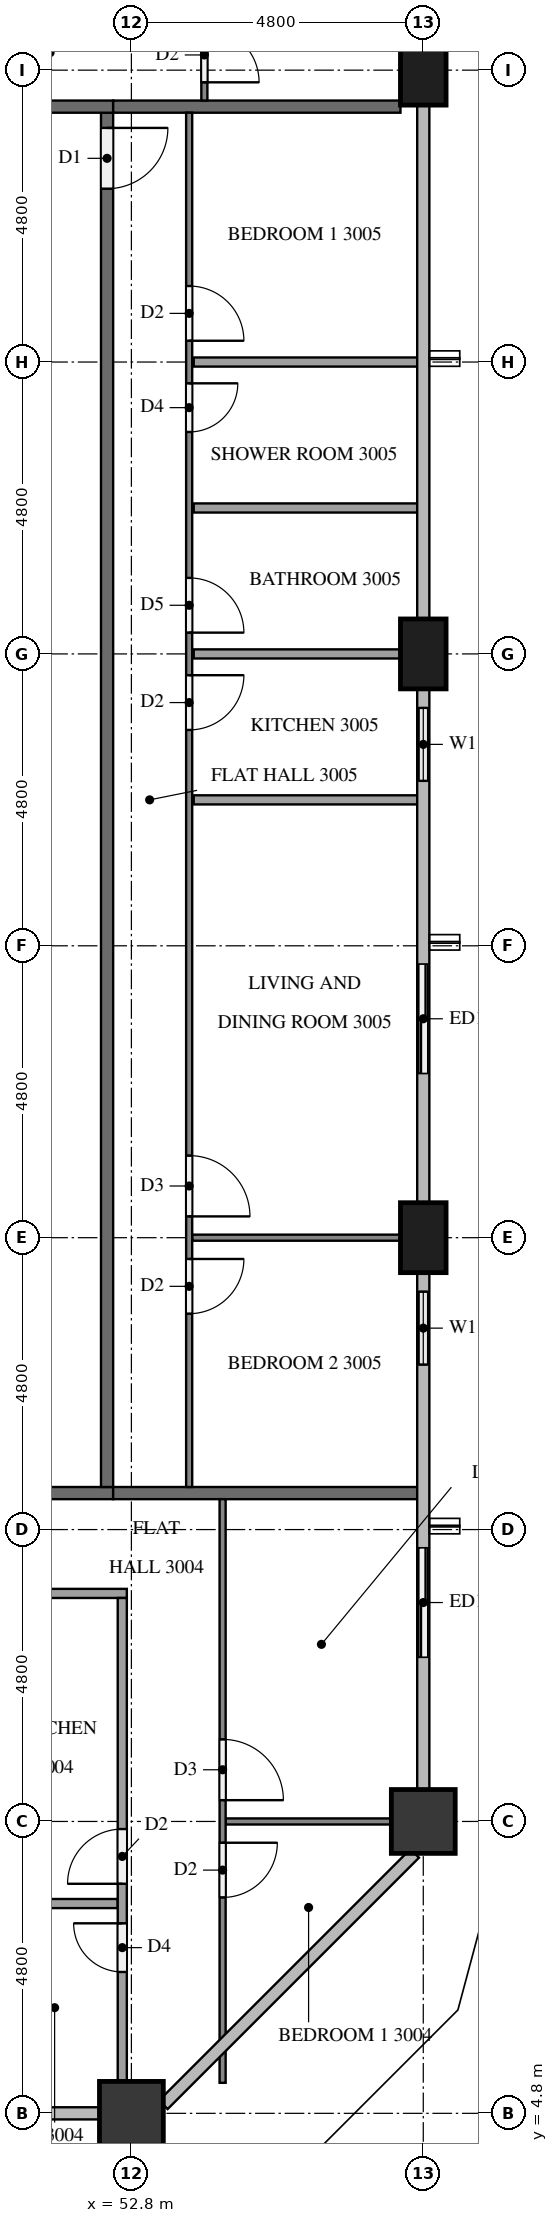
"""IFC4 building model, lengths in metres.
Left out: names, types, materials, properties, quantities, classifications, styles, units other than length and angle.
Written with IfcOpenShell. Run it as: python <this file> out.ifc"""

import sys

from ifc_helpers import new_model, si_unit, direction, frame, frame_2d, origin, origin_2d, place, context, subcontext, project, spatial, rectangle, extrude, element, fill, save


model = new_model("IFC4")
c1 = context("Model", 3, precision=1e-05, world=origin(), true_north=direction((0.0, 1.0)))
c2 = subcontext(c1, "Body", "Model", "MODEL_VIEW")
j1 = project(units=[si_unit("LENGTHUNIT", "METRE"), si_unit("PLANEANGLEUNIT", "RADIAN")], contexts=[c1])
p1 = place(None, origin())
s1 = spatial("IfcSite", under=j1, at=p1, CompositionType="ELEMENT")
p2 = place(p1, origin())
s2 = spatial("IfcBuilding", under=s1, at=p2, CompositionType="ELEMENT")
p3 = place(p2, frame((0.0, 0.0, 119.1)))
s3 = spatial("IfcBuildingStorey", under=s2, at=p3, CompositionType="ELEMENT", Elevation=119.1)
for number, where, z_axis, x_axis in (
    (1, (52.8, 4.8, 0.0), (0.0, 0.0, 1.0), (1.0, 0.0, 0.0)),
    (2, (57.6, 9.6, 0.0), (0.0, 0.0, 1.0), (1.0, 0.0, 0.0)),
):
    element("IfcColumn", number, at=place(p3, frame(where, z_axis=z_axis, x_axis=x_axis)), inside=s3, PredefinedType="COLUMN", context=c2, shape_type="SweptSolid", body=[
        extrude(rectangle(XDim=1.05, YDim=1.05, at=origin_2d()), origin(), (0.0, 0.0, 1.0), 3.2),
    ])
for number, where, z_axis, x_axis in (
    (3, (57.6, 19.2, 0.0), (0.0, 0.0, 1.0), (0.0, 1.0, 0.0)),
    (4, (57.6, 28.8, 0.0), (0.0, 0.0, 1.0), (0.0, 1.0, 0.0)),
    (5, (57.6, 38.4, 0.0), (0.0, 0.0, 1.0), (0.0, 1.0, 0.0)),
):
    element("IfcColumn", number, at=place(p3, frame(where, z_axis=z_axis, x_axis=x_axis)), inside=s3, PredefinedType="COLUMN", context=c2, shape_type="SweptSolid", body=[
        extrude(rectangle(XDim=1.15, YDim=0.75, at=origin_2d()), origin(), (0.0, 0.0, 1.0), 3.2),
    ])
p4 = place(p3, frame((57.6, 12.0, 0.0), z_axis=(0.0, 0.0, 1.0), x_axis=(0.0, 1.0, 0.0)))
e6 = element("IfcWall", 6, at=p4, inside=s3, PredefinedType="SOLIDWALL", context=c2, shape_type="SweptSolid", body=[
    extrude(rectangle(XDim=2.4, YDim=0.15, at=frame_2d((1.2, 0.0))), origin(), (0.0, 0.0, 1.0), 3.2),
])
p5 = place(p4, frame((0.3, 0.0, 0.0)))
e7 = element("IfcOpeningElement", 7, at=p5, cuts=e6, PredefinedType="OPENING", context=c2, shape_type="SweptSolid", body=[
    extrude(rectangle(XDim=1.8, YDim=2.4, at=frame_2d((0.9, 1.2))), frame((0.0, 0.085, 0.0), z_axis=(0.0, -1.0, 0.0), x_axis=(1.0, 0.0, 0.0)), (0.0, 0.0, 1.0), 0.17),
])
p6 = place(p3, frame((57.6, 16.8, 0.0), z_axis=(0.0, 0.0, 1.0), x_axis=(0.0, 1.0, 0.0)))
e8 = element("IfcWall", 8, at=p6, inside=s3, PredefinedType="SOLIDWALL", context=c2, shape_type="SweptSolid", body=[
    extrude(rectangle(XDim=1.825, YDim=0.15, at=frame_2d((0.913, 0.0))), origin(), (0.0, 0.0, 1.0), 3.2),
])
p7 = place(p6, frame((0.312, 0.0, 0.9)))
e9 = element("IfcOpeningElement", 9, at=p7, cuts=e8, PredefinedType="OPENING", context=c2, shape_type="SweptSolid", body=[
    extrude(rectangle(XDim=1.2, YDim=1.4, at=frame_2d((0.6, 0.7))), frame((0.0, 0.085, 0.0), z_axis=(0.0, -1.0, 0.0), x_axis=(1.0, 0.0, 0.0)), (0.0, 0.0, 1.0), 0.17),
])
p8 = place(p3, frame((57.6, 21.6, 0.0), z_axis=(0.0, 0.0, 1.0), x_axis=(0.0, 1.0, 0.0)))
e10 = element("IfcWall", 10, at=p8, inside=s3, PredefinedType="SOLIDWALL", context=c2, shape_type="SweptSolid", body=[
    extrude(rectangle(XDim=2.4, YDim=0.15, at=frame_2d((1.2, 0.0))), origin(), (0.0, 0.0, 1.0), 3.2),
])
p9 = place(p8, frame((0.3, 0.0, 0.0)))
e11 = element("IfcOpeningElement", 11, at=p9, cuts=e10, PredefinedType="OPENING", context=c2, shape_type="SweptSolid", body=[
    extrude(rectangle(XDim=1.8, YDim=2.4, at=frame_2d((0.9, 1.2))), frame((0.0, 0.085, 0.0), z_axis=(0.0, -1.0, 0.0), x_axis=(1.0, 0.0, 0.0)), (0.0, 0.0, 1.0), 0.17),
])
p10 = place(p3, frame((57.6, 26.4, 0.0), z_axis=(0.0, 0.0, 1.0), x_axis=(0.0, 1.0, 0.0)))
e12 = element("IfcWall", 12, at=p10, inside=s3, PredefinedType="SOLIDWALL", context=c2, shape_type="SweptSolid", body=[
    extrude(rectangle(XDim=1.825, YDim=0.15, at=frame_2d((0.913, 0.0))), origin(), (0.0, 0.0, 1.0), 3.2),
])
p11 = place(p10, frame((0.312, 0.0, 0.9)))
e13 = element("IfcOpeningElement", 13, at=p11, cuts=e12, PredefinedType="OPENING", context=c2, shape_type="SweptSolid", body=[
    extrude(rectangle(XDim=1.2, YDim=1.4, at=frame_2d((0.6, 0.7))), frame((0.0, 0.085, 0.0), z_axis=(0.0, -1.0, 0.0), x_axis=(1.0, 0.0, 0.0)), (0.0, 0.0, 1.0), 0.17),
])
p12 = place(p3, frame((50.3, 15.0, 0.0), z_axis=(0.0, 0.0, 1.0), x_axis=(1.0, 0.0, 0.0)))
e14 = element("IfcWall", 14, at=p12, inside=s3, PredefinedType="PARTITIONING", context=c2, shape_type="SweptSolid", body=[
    extrude(rectangle(XDim=2.2, YDim=0.2, at=frame_2d((1.1, 0.0))), origin(), (0.0, 0.0, 1.0), 3.2),
])
p13 = place(p3, frame((52.4, 37.7, 0.0), z_axis=(0.0, 0.0, 1.0), x_axis=(0.0, -1.0, 0.0)))
e15 = element("IfcWall", 15, at=p13, inside=s3, PredefinedType="PARTITIONING", context=c2, shape_type="SweptSolid", body=[
    extrude(rectangle(XDim=22.6, YDim=0.2, at=frame_2d((11.3, 0.0))), origin(), (0.0, 0.0, 1.0), 3.2),
])
p14 = place(p13, frame((0.25, 0.0, 0.0)))
e16 = element("IfcOpeningElement", 16, at=p14, cuts=e15, PredefinedType="OPENING", context=c2, shape_type="SweptSolid", body=[
    extrude(rectangle(XDim=1.0, YDim=2.1, at=frame_2d((0.5, 1.05))), frame((0.0, 0.11, 0.0), z_axis=(0.0, -1.0, 0.0), x_axis=(1.0, 0.0, 0.0)), (0.0, 0.0, 1.0), 0.22),
])
p15 = place(p3, frame((52.5, 37.8, 0.0), z_axis=(0.0, 0.0, 1.0), x_axis=(-1.0, 0.0, 0.0)))
e17 = element("IfcWall", 17, at=p15, inside=s3, PredefinedType="PARTITIONING", context=c2, shape_type="SweptSolid", body=[
    extrude(rectangle(XDim=2.2, YDim=0.2, at=frame_2d((1.1, 0.0))), origin(), (0.0, 0.0, 1.0), 3.2),
])
p16 = place(p3, frame((52.5, 15.0, 0.0), z_axis=(0.0, 0.0, 1.0), x_axis=(1.0, 0.0, 0.0)))
e18 = element("IfcWall", 18, at=p16, inside=s3, PredefinedType="PARTITIONING", context=c2, shape_type="SweptSolid", body=[
    extrude(rectangle(XDim=5.0, YDim=0.2, at=frame_2d((2.5, 0.0))), origin(), (0.0, 0.0, 1.0), 3.2),
])
p17 = place(p3, frame((52.5, 37.8, 0.0), z_axis=(0.0, 0.0, 1.0), x_axis=(1.0, 0.0, 0.0)))
e19 = element("IfcWall", 19, at=p17, inside=s3, PredefinedType="PARTITIONING", context=c2, shape_type="SweptSolid", body=[
    extrude(rectangle(XDim=4.725, YDim=0.2, at=frame_2d((2.363, 0.0))), origin(), (0.0, 0.0, 1.0), 3.2),
])
p18 = place(p3, frame((54.35, 9.6, 0.0), z_axis=(0.0, 0.0, 1.0), x_axis=(1.0, 0.0, 0.0)))
e20 = element("IfcWall", 20, at=p18, inside=s3, PredefinedType="PARTITIONING", context=c2, shape_type="SweptSolid", body=[
    extrude(rectangle(XDim=2.725, YDim=0.1, at=frame_2d((1.362, 0.0))), origin(), (0.0, 0.0, 1.0), 3.2),
])
p19 = place(p3, frame((54.3, 14.9, 0.0), z_axis=(0.0, 0.0, 1.0), x_axis=(0.0, -1.0, 0.0)))
e21 = element("IfcWall", 21, at=p19, inside=s3, PredefinedType="PARTITIONING", context=c2, shape_type="SweptSolid", body=[
    extrude(rectangle(XDim=9.598, YDim=0.1, at=frame_2d((4.799, 0.0))), origin(), (0.0, 0.0, 1.0), 3.2),
])
p20 = place(p19, frame((3.95, 0.0, 0.0)))
e22 = element("IfcOpeningElement", 22, at=p20, cuts=e21, PredefinedType="OPENING", context=c2, shape_type="SweptSolid", body=[
    extrude(rectangle(XDim=1.0, YDim=2.1, at=frame_2d((0.5, 1.05))), frame((0.0, 0.06, 0.0), z_axis=(0.0, -1.0, 0.0), x_axis=(1.0, 0.0, 0.0)), (0.0, 0.0, 1.0), 0.12),
])
p21 = place(p19, frame((5.65, 0.0, 0.0)))
e23 = element("IfcOpeningElement", 23, at=p21, cuts=e21, PredefinedType="OPENING", context=c2, shape_type="SweptSolid", body=[
    extrude(rectangle(XDim=0.9, YDim=2.1, at=frame_2d((0.45, 1.05))), frame((0.0, 0.06, 0.0), z_axis=(0.0, -1.0, 0.0), x_axis=(1.0, 0.0, 0.0)), (0.0, 0.0, 1.0), 0.12),
])
p22 = place(p3, frame((50.5, 8.25, 0.0), z_axis=(0.0, 0.0, 1.0), x_axis=(1.0, 0.0, 0.0)))
e24 = element("IfcWall", 24, at=p22, inside=s3, PredefinedType="PARTITIONING", context=c2, shape_type="SweptSolid", body=[
    extrude(rectangle(XDim=2.075, YDim=0.15, at=frame_2d((1.038, 0.0))), origin(), (0.0, 0.0, 1.0), 3.2),
])
p23 = place(p3, frame((50.5, 13.35, 0.0), z_axis=(0.0, 0.0, 1.0), x_axis=(1.0, 0.0, 0.0)))
e25 = element("IfcWall", 25, at=p23, inside=s3, PredefinedType="PARTITIONING", context=c2, shape_type="SweptSolid", body=[
    extrude(rectangle(XDim=2.225, YDim=0.15, at=frame_2d((1.113, 0.0))), origin(), (0.0, 0.0, 1.0), 3.2),
])
p24 = place(p3, frame((52.65, 5.325, 0.0), z_axis=(0.0, 0.0, 1.0), x_axis=(0.0, 1.0, 0.0)))
e26 = element("IfcWall", 26, at=p24, inside=s3, PredefinedType="PARTITIONING", context=c2, shape_type="SweptSolid", body=[
    extrude(rectangle(XDim=7.95, YDim=0.15, at=frame_2d((3.975, 0.0))), origin(), (0.0, 0.0, 1.0), 3.2),
])
p25 = place(p24, frame((3.25, 0.0, 0.0)))
e27 = element("IfcOpeningElement", 27, at=p25, cuts=e26, PredefinedType="OPENING", context=c2, shape_type="SweptSolid", body=[
    extrude(rectangle(XDim=0.9, YDim=2.1, at=frame_2d((0.45, 1.05))), frame((0.0, 0.085, 0.0), z_axis=(0.0, -1.0, 0.0), x_axis=(1.0, 0.0, 0.0)), (0.0, 0.0, 1.0), 0.17),
])
p26 = place(p24, frame((1.8, 0.0, 0.0)))
e28 = element("IfcOpeningElement", 28, at=p26, cuts=e26, PredefinedType="OPENING", context=c2, shape_type="SweptSolid", body=[
    extrude(rectangle(XDim=0.8, YDim=2.1, at=frame_2d((0.4, 1.05))), frame((0.0, 0.085, 0.0), z_axis=(0.0, -1.0, 0.0), x_axis=(1.0, 0.0, 0.0)), (0.0, 0.0, 1.0), 0.17),
])
for number, where, z_axis, x_axis in (
    (29, (53.825, 33.6, 0.0), (0.0, 0.0, 1.0), (1.0, 0.0, 0.0)),
    (30, (53.825, 31.2, 0.0), (0.0, 0.0, 1.0), (1.0, 0.0, 0.0)),
):
    element("IfcWall", number, at=place(p3, frame(where, z_axis=z_axis, x_axis=x_axis)), inside=s3, PredefinedType="PARTITIONING", context=c2, shape_type="SweptSolid", body=[
        extrude(rectangle(XDim=3.675, YDim=0.15, at=frame_2d((1.837, 0.0))), origin(), (0.0, 0.0, 1.0), 3.2),
    ])
p27 = place(p3, frame((53.825, 28.8, 0.0), z_axis=(0.0, 0.0, 1.0), x_axis=(1.0, 0.0, 0.0)))
e31 = element("IfcWall", 31, at=p27, inside=s3, PredefinedType="PARTITIONING", context=c2, shape_type="SweptSolid", body=[
    extrude(rectangle(XDim=3.4, YDim=0.15, at=frame_2d((1.7, 0.0))), origin(), (0.0, 0.0, 1.0), 3.2),
])
p28 = place(p3, frame((53.825, 26.4, 0.0), z_axis=(0.0, 0.0, 1.0), x_axis=(1.0, 0.0, 0.0)))
e32 = element("IfcWall", 32, at=p28, inside=s3, PredefinedType="PARTITIONING", context=c2, shape_type="SweptSolid", body=[
    extrude(rectangle(XDim=3.675, YDim=0.15, at=frame_2d((1.837, 0.0))), origin(), (0.0, 0.0, 1.0), 3.2),
])
p29 = place(p3, frame((53.8, 19.2, 0.0), z_axis=(0.0, 0.0, 1.0), x_axis=(1.0, 0.0, 0.0)))
e33 = element("IfcWall", 33, at=p29, inside=s3, PredefinedType="PARTITIONING", context=c2, shape_type="SweptSolid", body=[
    extrude(rectangle(XDim=3.425, YDim=0.1, at=frame_2d((1.712, 0.0))), origin(), (0.0, 0.0, 1.0), 3.2),
])
p30 = place(p3, frame((53.75, 37.7, 0.0), z_axis=(0.0, 0.0, 1.0), x_axis=(0.0, -1.0, 0.0)))
e34 = element("IfcWall", 34, at=p30, inside=s3, PredefinedType="PARTITIONING", context=c2, shape_type="SweptSolid", body=[
    extrude(rectangle(XDim=22.6, YDim=0.1, at=frame_2d((11.3, 0.0))), origin(), (0.0, 0.0, 1.0), 3.2),
])
p31 = place(p30, frame((2.85, 0.0, 0.0)))
e35 = element("IfcOpeningElement", 35, at=p31, cuts=e34, PredefinedType="OPENING", context=c2, shape_type="SweptSolid", body=[
    extrude(rectangle(XDim=0.9, YDim=2.1, at=frame_2d((0.45, 1.05))), frame((0.0, 0.06, 0.0), z_axis=(0.0, -1.0, 0.0), x_axis=(1.0, 0.0, 0.0)), (0.0, 0.0, 1.0), 0.12),
])
p32 = place(p30, frame((4.45, 0.0, 0.0)))
e36 = element("IfcOpeningElement", 36, at=p32, cuts=e34, PredefinedType="OPENING", context=c2, shape_type="SweptSolid", body=[
    extrude(rectangle(XDim=0.8, YDim=2.1, at=frame_2d((0.4, 1.05))), frame((0.0, 0.06, 0.0), z_axis=(0.0, -1.0, 0.0), x_axis=(1.0, 0.0, 0.0)), (0.0, 0.0, 1.0), 0.12),
])
p33 = place(p30, frame((7.65, 0.0, 0.0)))
e37 = element("IfcOpeningElement", 37, at=p33, cuts=e34, PredefinedType="OPENING", context=c2, shape_type="SweptSolid", body=[
    extrude(rectangle(XDim=0.9, YDim=2.1, at=frame_2d((0.45, 1.05))), frame((0.0, 0.06, 0.0), z_axis=(0.0, -1.0, 0.0), x_axis=(1.0, 0.0, 0.0)), (0.0, 0.0, 1.0), 0.12),
])
p34 = place(p30, frame((9.25, 0.0, 0.0)))
e38 = element("IfcOpeningElement", 38, at=p34, cuts=e34, PredefinedType="OPENING", context=c2, shape_type="SweptSolid", body=[
    extrude(rectangle(XDim=0.9, YDim=2.1, at=frame_2d((0.45, 1.05))), frame((0.0, 0.06, 0.0), z_axis=(0.0, -1.0, 0.0), x_axis=(1.0, 0.0, 0.0)), (0.0, 0.0, 1.0), 0.12),
])
p35 = place(p30, frame((17.15, 0.0, 0.0)))
e39 = element("IfcOpeningElement", 39, at=p35, cuts=e34, PredefinedType="OPENING", context=c2, shape_type="SweptSolid", body=[
    extrude(rectangle(XDim=1.0, YDim=2.1, at=frame_2d((0.5, 1.05))), frame((0.0, 0.06, 0.0), z_axis=(0.0, -1.0, 0.0), x_axis=(1.0, 0.0, 0.0)), (0.0, 0.0, 1.0), 0.12),
])
p36 = place(p30, frame((18.85, 0.0, 0.0)))
e40 = element("IfcOpeningElement", 40, at=p36, cuts=e34, PredefinedType="OPENING", context=c2, shape_type="SweptSolid", body=[
    extrude(rectangle(XDim=0.9, YDim=2.1, at=frame_2d((0.45, 1.05))), frame((0.0, 0.06, 0.0), z_axis=(0.0, -1.0, 0.0), x_axis=(1.0, 0.0, 0.0)), (0.0, 0.0, 1.0), 0.12),
])
p37 = place(p3, frame((54.0, 52.378, 0.0), z_axis=(0.0, 0.0, 1.0), x_axis=(0.0, -1.0, 0.0)))
e41 = element("IfcWall", 41, at=p37, inside=s3, PredefinedType="PARTITIONING", context=c2, shape_type="SweptSolid", body=[
    extrude(rectangle(XDim=14.479, YDim=0.1, at=frame_2d((7.239, 0.0))), origin(), (0.0, 0.0, 1.0), 3.2),
])
p38 = place(p37, frame((13.279, 0.0, 0.0)))
e42 = element("IfcOpeningElement", 42, at=p38, cuts=e41, PredefinedType="OPENING", context=c2, shape_type="SweptSolid", body=[
    extrude(rectangle(XDim=0.9, YDim=2.1, at=frame_2d((0.45, 1.05))), frame((0.0, 0.06, 0.0), z_axis=(0.0, -1.0, 0.0), x_axis=(1.0, 0.0, 0.0)), (0.0, 0.0, 1.0), 0.12),
])
p39 = place(p37, frame((4.729, 0.0, 0.0)))
e43 = element("IfcOpeningElement", 43, at=p39, cuts=e41, PredefinedType="OPENING", context=c2, shape_type="SweptSolid", body=[
    extrude(rectangle(XDim=1.0, YDim=2.1, at=frame_2d((0.5, 1.05))), frame((0.0, 0.06, 0.0), z_axis=(0.0, -1.0, 0.0), x_axis=(1.0, 0.0, 0.0)), (0.0, 0.0, 1.0), 0.12),
])
p40 = place(p37, frame((3.128, 0.0, 0.0)))
e44 = element("IfcOpeningElement", 44, at=p40, cuts=e41, PredefinedType="OPENING", context=c2, shape_type="SweptSolid", body=[
    extrude(rectangle(XDim=0.9, YDim=2.1, at=frame_2d((0.45, 1.05))), frame((0.0, 0.06, 0.0), z_axis=(0.0, -1.0, 0.0), x_axis=(1.0, 0.0, 0.0)), (0.0, 0.0, 1.0), 0.12),
])
p41 = place(p5, origin())
e45 = element("IfcDoor", 45, at=p41, inside=s3, OperationType="SLIDING_TO_LEFT", PredefinedType="DOOR", context=c2, shape_type="SweptSolid", body=[
    extrude(rectangle(XDim=1.8, YDim=2.4, at=frame_2d((0.9, 1.2))), frame((0.0, 0.025, 0.0), z_axis=(0.0, -1.0, 0.0), x_axis=(1.0, 0.0, 0.0)), (0.0, 0.0, 1.0), 0.05),
])
fill(e7, e45)
p42 = place(p7, origin())
e46 = element("IfcWindow", 46, at=p42, inside=s3, PartitioningType="SINGLE_PANEL", PredefinedType="WINDOW", context=c2, shape_type="SweptSolid", body=[
    extrude(rectangle(XDim=1.2, YDim=1.4, at=frame_2d((0.6, 0.7))), frame((0.0, 0.03, 0.0), z_axis=(0.0, -1.0, 0.0), x_axis=(1.0, 0.0, 0.0)), (0.0, 0.0, 1.0), 0.06),
])
fill(e9, e46)
p43 = place(p9, origin())
e47 = element("IfcDoor", 47, at=p43, inside=s3, OperationType="SLIDING_TO_RIGHT", PredefinedType="DOOR", context=c2, shape_type="SweptSolid", body=[
    extrude(rectangle(XDim=1.8, YDim=2.4, at=frame_2d((0.9, 1.2))), frame((0.0, 0.025, 0.0), z_axis=(0.0, -1.0, 0.0), x_axis=(1.0, 0.0, 0.0)), (0.0, 0.0, 1.0), 0.05),
])
fill(e11, e47)
p44 = place(p11, origin())
e48 = element("IfcWindow", 48, at=p44, inside=s3, PartitioningType="SINGLE_PANEL", PredefinedType="WINDOW", context=c2, shape_type="SweptSolid", body=[
    extrude(rectangle(XDim=1.2, YDim=1.4, at=frame_2d((0.6, 0.7))), frame((0.0, 0.03, 0.0), z_axis=(0.0, -1.0, 0.0), x_axis=(1.0, 0.0, 0.0)), (0.0, 0.0, 1.0), 0.06),
])
fill(e13, e48)
p45 = place(p14, origin())
e49 = element("IfcDoor", 49, at=p45, inside=s3, OperationType="SINGLE_SWING_LEFT", PredefinedType="DOOR", context=c2, shape_type="SweptSolid", body=[
    extrude(rectangle(XDim=1.0, YDim=2.1, at=frame_2d((0.5, 1.05))), frame((0.0, 0.025, 0.0), z_axis=(0.0, -1.0, 0.0), x_axis=(1.0, 0.0, 0.0)), (0.0, 0.0, 1.0), 0.05),
])
fill(e16, e49)
p46 = place(p20, origin())
e50 = element("IfcDoor", 50, at=p46, inside=s3, OperationType="SINGLE_SWING_RIGHT", PredefinedType="DOOR", context=c2, shape_type="SweptSolid", body=[
    extrude(rectangle(XDim=1.0, YDim=2.1, at=frame_2d((0.5, 1.05))), frame((0.0, 0.025, 0.0), z_axis=(0.0, -1.0, 0.0), x_axis=(1.0, 0.0, 0.0)), (0.0, 0.0, 1.0), 0.05),
])
fill(e22, e50)
p47 = place(p21, origin())
e51 = element("IfcDoor", 51, at=p47, inside=s3, OperationType="SINGLE_SWING_LEFT", PredefinedType="DOOR", context=c2, shape_type="SweptSolid", body=[
    extrude(rectangle(XDim=0.9, YDim=2.1, at=frame_2d((0.45, 1.05))), frame((0.0, 0.025, 0.0), z_axis=(0.0, -1.0, 0.0), x_axis=(1.0, 0.0, 0.0)), (0.0, 0.0, 1.0), 0.05),
])
fill(e23, e51)
p48 = place(p25, origin())
e52 = element("IfcDoor", 52, at=p48, inside=s3, OperationType="SINGLE_SWING_LEFT", PredefinedType="DOOR", context=c2, shape_type="SweptSolid", body=[
    extrude(rectangle(XDim=0.9, YDim=2.1, at=frame_2d((0.45, 1.05))), frame((0.0, 0.025, 0.0), z_axis=(0.0, -1.0, 0.0), x_axis=(1.0, 0.0, 0.0)), (0.0, 0.0, 1.0), 0.05),
])
fill(e27, e52)
p49 = place(p26, origin())
e53 = element("IfcDoor", 53, at=p49, inside=s3, OperationType="SINGLE_SWING_RIGHT", PredefinedType="DOOR", context=c2, shape_type="SweptSolid", body=[
    extrude(rectangle(XDim=0.8, YDim=2.1, at=frame_2d((0.4, 1.05))), frame((0.0, 0.025, 0.0), z_axis=(0.0, -1.0, 0.0), x_axis=(1.0, 0.0, 0.0)), (0.0, 0.0, 1.0), 0.05),
])
fill(e28, e53)
p50 = place(p31, origin())
e54 = element("IfcDoor", 54, at=p50, inside=s3, OperationType="SINGLE_SWING_RIGHT", PredefinedType="DOOR", context=c2, shape_type="SweptSolid", body=[
    extrude(rectangle(XDim=0.9, YDim=2.1, at=frame_2d((0.45, 1.05))), frame((0.0, 0.025, 0.0), z_axis=(0.0, -1.0, 0.0), x_axis=(1.0, 0.0, 0.0)), (0.0, 0.0, 1.0), 0.05),
])
fill(e35, e54)
p51 = place(p32, origin())
e55 = element("IfcDoor", 55, at=p51, inside=s3, OperationType="SINGLE_SWING_LEFT", PredefinedType="DOOR", context=c2, shape_type="SweptSolid", body=[
    extrude(rectangle(XDim=0.8, YDim=2.1, at=frame_2d((0.4, 1.05))), frame((0.0, 0.025, 0.0), z_axis=(0.0, -1.0, 0.0), x_axis=(1.0, 0.0, 0.0)), (0.0, 0.0, 1.0), 0.05),
])
fill(e36, e55)
p52 = place(p33, origin())
e56 = element("IfcDoor", 56, at=p52, inside=s3, OperationType="SINGLE_SWING_RIGHT", PredefinedType="DOOR", context=c2, shape_type="SweptSolid", body=[
    extrude(rectangle(XDim=0.9, YDim=2.1, at=frame_2d((0.45, 1.05))), frame((0.0, 0.025, 0.0), z_axis=(0.0, -1.0, 0.0), x_axis=(1.0, 0.0, 0.0)), (0.0, 0.0, 1.0), 0.05),
])
fill(e37, e56)
p53 = place(p34, origin())
e57 = element("IfcDoor", 57, at=p53, inside=s3, OperationType="SINGLE_SWING_LEFT", PredefinedType="DOOR", context=c2, shape_type="SweptSolid", body=[
    extrude(rectangle(XDim=0.9, YDim=2.1, at=frame_2d((0.45, 1.05))), frame((0.0, 0.025, 0.0), z_axis=(0.0, -1.0, 0.0), x_axis=(1.0, 0.0, 0.0)), (0.0, 0.0, 1.0), 0.05),
])
fill(e38, e57)
p54 = place(p35, origin())
e58 = element("IfcDoor", 58, at=p54, inside=s3, OperationType="SINGLE_SWING_RIGHT", PredefinedType="DOOR", context=c2, shape_type="SweptSolid", body=[
    extrude(rectangle(XDim=1.0, YDim=2.1, at=frame_2d((0.5, 1.05))), frame((0.0, 0.025, 0.0), z_axis=(0.0, -1.0, 0.0), x_axis=(1.0, 0.0, 0.0)), (0.0, 0.0, 1.0), 0.05),
])
fill(e39, e58)
p55 = place(p36, origin())
e59 = element("IfcDoor", 59, at=p55, inside=s3, OperationType="SINGLE_SWING_LEFT", PredefinedType="DOOR", context=c2, shape_type="SweptSolid", body=[
    extrude(rectangle(XDim=0.9, YDim=2.1, at=frame_2d((0.45, 1.05))), frame((0.0, 0.025, 0.0), z_axis=(0.0, -1.0, 0.0), x_axis=(1.0, 0.0, 0.0)), (0.0, 0.0, 1.0), 0.05),
])
fill(e40, e59)
p56 = place(p38, origin())
e60 = element("IfcDoor", 60, at=p56, inside=s3, OperationType="SINGLE_SWING_RIGHT", PredefinedType="DOOR", context=c2, shape_type="SweptSolid", body=[
    extrude(rectangle(XDim=0.9, YDim=2.1, at=frame_2d((0.45, 1.05))), frame((0.0, 0.025, 0.0), z_axis=(0.0, -1.0, 0.0), x_axis=(1.0, 0.0, 0.0)), (0.0, 0.0, 1.0), 0.05),
])
fill(e42, e60)
save(model, sys.argv[1])
